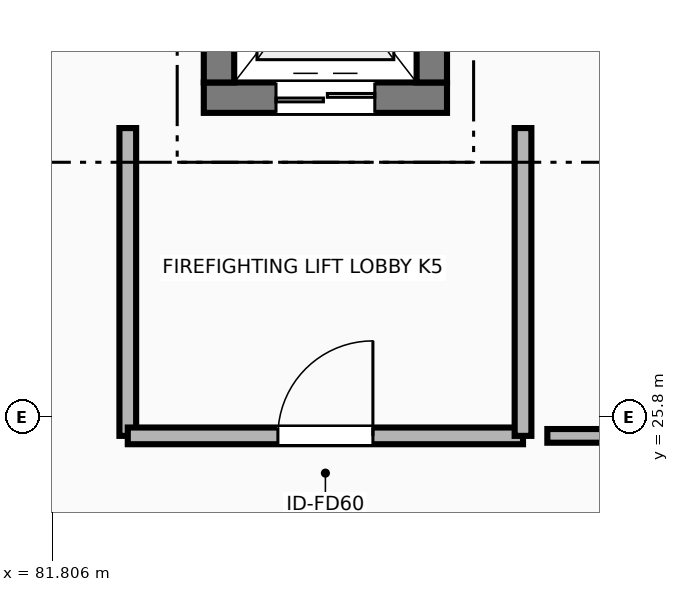
"""IFC4 building model, lengths in metres.
Left out: names, types, materials, properties, quantities, classifications, styles, units other than length and angle.
Written with IfcOpenShell. Run it as: python <this file> out.ifc"""

import sys

from ifc_helpers import new_model, si_unit, direction, frame, frame_2d, origin, place, context, subcontext, project, spatial, rectangle, extrude, element, fill, save


model = new_model("IFC4")
c1 = context("Model", 3, precision=1e-05, world=origin(), true_north=direction((0.0, 1.0)))
c2 = subcontext(c1, "Body", "Model", "MODEL_VIEW")
j1 = project(units=[si_unit("LENGTHUNIT", "METRE"), si_unit("PLANEANGLEUNIT", "RADIAN")], contexts=[c1])
p1 = place(None, origin())
s1 = spatial("IfcSite", under=j1, at=p1, CompositionType="ELEMENT")
p2 = place(p1, origin())
s2 = spatial("IfcBuilding", under=s1, at=p2, CompositionType="ELEMENT")
p3 = place(p2, origin())
s3 = spatial("IfcBuildingStorey", under=s2, at=p3, CompositionType="ELEMENT", Elevation=0.0)
p4 = place(p3, frame((83.8, 30.0, 0.0), z_axis=(0.0, 0.0, 1.0), x_axis=(1.0, 0.0, 0.0)))
e1 = element("IfcWall", 1, at=p4, inside=s3, PredefinedType="SHEAR", context=c2, shape_type="SweptSolid", body=[
    extrude(rectangle(XDim=3.2, YDim=0.4, at=frame_2d((1.6, 0.0))), origin(), (0.0, 0.0, 1.0), 5.4),
])
p5 = place(p4, frame((0.95, 0.0, 0.0)))
e2 = element("IfcOpeningElement", 2, at=p5, cuts=e1, PredefinedType="OPENING", context=c2, shape_type="SweptSolid", body=[
    extrude(rectangle(XDim=1.3, YDim=2.25, at=frame_2d((0.65, 1.125))), frame((0.0, 0.21, 0.0), z_axis=(0.0, -1.0, 0.0), x_axis=(1.0, 0.0, 0.0)), (0.0, 0.0, 1.0), 0.42),
])
for number, where, z_axis, x_axis in (
    (3, (84.0, 30.2, 0.0), (0.0, 0.0, 1.0), (0.0, 1.0, 0.0)),
    (4, (86.8, 33.3, 0.0), (0.0, 0.0, 1.0), (0.0, -1.0, 0.0)),
):
    element("IfcWall", number, at=place(p3, frame(where, z_axis=z_axis, x_axis=x_axis)), inside=s3, PredefinedType="SHEAR", context=c2, shape_type="SweptSolid", body=[
        extrude(rectangle(XDim=3.1, YDim=0.4, at=frame_2d((1.55, 0.0))), origin(), (0.0, 0.0, 1.0), 5.4),
    ])
p6 = place(p3, frame((82.8, 29.6, 0.0), z_axis=(0.0, 0.0, 1.0), x_axis=(0.0, -1.0, 0.0)))
e5 = element("IfcWall", 5, at=p6, inside=s3, PredefinedType="PARTITIONING", context=c2, shape_type="SweptSolid", body=[
    extrude(rectangle(XDim=4.05, YDim=0.22, at=frame_2d((2.025, 0.0))), origin(), (0.0, 0.0, 1.0), 5.12),
])
p7 = place(p3, frame((82.8, 25.55, 0.0), z_axis=(0.0, 0.0, 1.0), x_axis=(1.0, 0.0, 0.0)))
e6 = element("IfcWall", 6, at=p7, inside=s3, PredefinedType="PARTITIONING", context=c2, shape_type="SweptSolid", body=[
    extrude(rectangle(XDim=5.2, YDim=0.22, at=frame_2d((2.6, 0.0))), origin(), (0.0, 0.0, 1.0), 4.425),
])
p8 = place(p7, frame((1.975, 0.0, 0.0)))
e7 = element("IfcOpeningElement", 7, at=p8, cuts=e6, PredefinedType="OPENING", context=c2, shape_type="SweptSolid", body=[
    extrude(rectangle(XDim=1.25, YDim=2.2, at=frame_2d((0.625, 1.1))), frame((0.0, 0.12, 0.0), z_axis=(0.0, -1.0, 0.0), x_axis=(1.0, 0.0, 0.0)), (0.0, 0.0, 1.0), 0.24),
])
p9 = place(p3, frame((88.0, 25.55, 0.0), z_axis=(0.0, 0.0, 1.0), x_axis=(0.0, 1.0, 0.0)))
e8 = element("IfcWall", 8, at=p9, inside=s3, PredefinedType="PARTITIONING", context=c2, shape_type="SweptSolid", body=[
    extrude(rectangle(XDim=4.05, YDim=0.22, at=frame_2d((2.025, 0.0))), origin(), (0.0, 0.0, 1.0), 5.12),
])
p10 = place(p3, frame((91.02, 25.55, 0.0), z_axis=(0.0, 0.0, 1.0), x_axis=(-1.0, 0.0, 0.0)))
e9 = element("IfcWall", 9, at=p10, inside=s3, PredefinedType="PARTITIONING", context=c2, shape_type="SweptSolid", body=[
    extrude(rectangle(XDim=2.7, YDim=0.18, at=frame_2d((1.35, 0.0))), origin(), (0.0, 0.0, 1.0), 4.425),
])
p11 = place(p5, origin())
e10 = element("IfcDoor", 10, at=p11, inside=s3, OperationType="DOUBLE_DOOR_SLIDING", PredefinedType="DOOR", context=c2, shape_type="SweptSolid", body=[
    extrude(rectangle(XDim=1.3, YDim=2.25, at=frame_2d((0.65, 1.125))), frame((0.0, 0.025, 0.0), z_axis=(0.0, -1.0, 0.0), x_axis=(1.0, 0.0, 0.0)), (0.0, 0.0, 1.0), 0.05),
])
fill(e2, e10)
p12 = place(p8, origin())
e11 = element("IfcDoor", 11, at=p12, inside=s3, OperationType="SINGLE_SWING_RIGHT", PredefinedType="DOOR", context=c2, shape_type="SweptSolid", body=[
    extrude(rectangle(XDim=1.25, YDim=2.2, at=frame_2d((0.625, 1.1))), frame((0.0, 0.025, 0.0), z_axis=(0.0, -1.0, 0.0), x_axis=(1.0, 0.0, 0.0)), (0.0, 0.0, 1.0), 0.05),
])
fill(e7, e11)
save(model, sys.argv[1])
